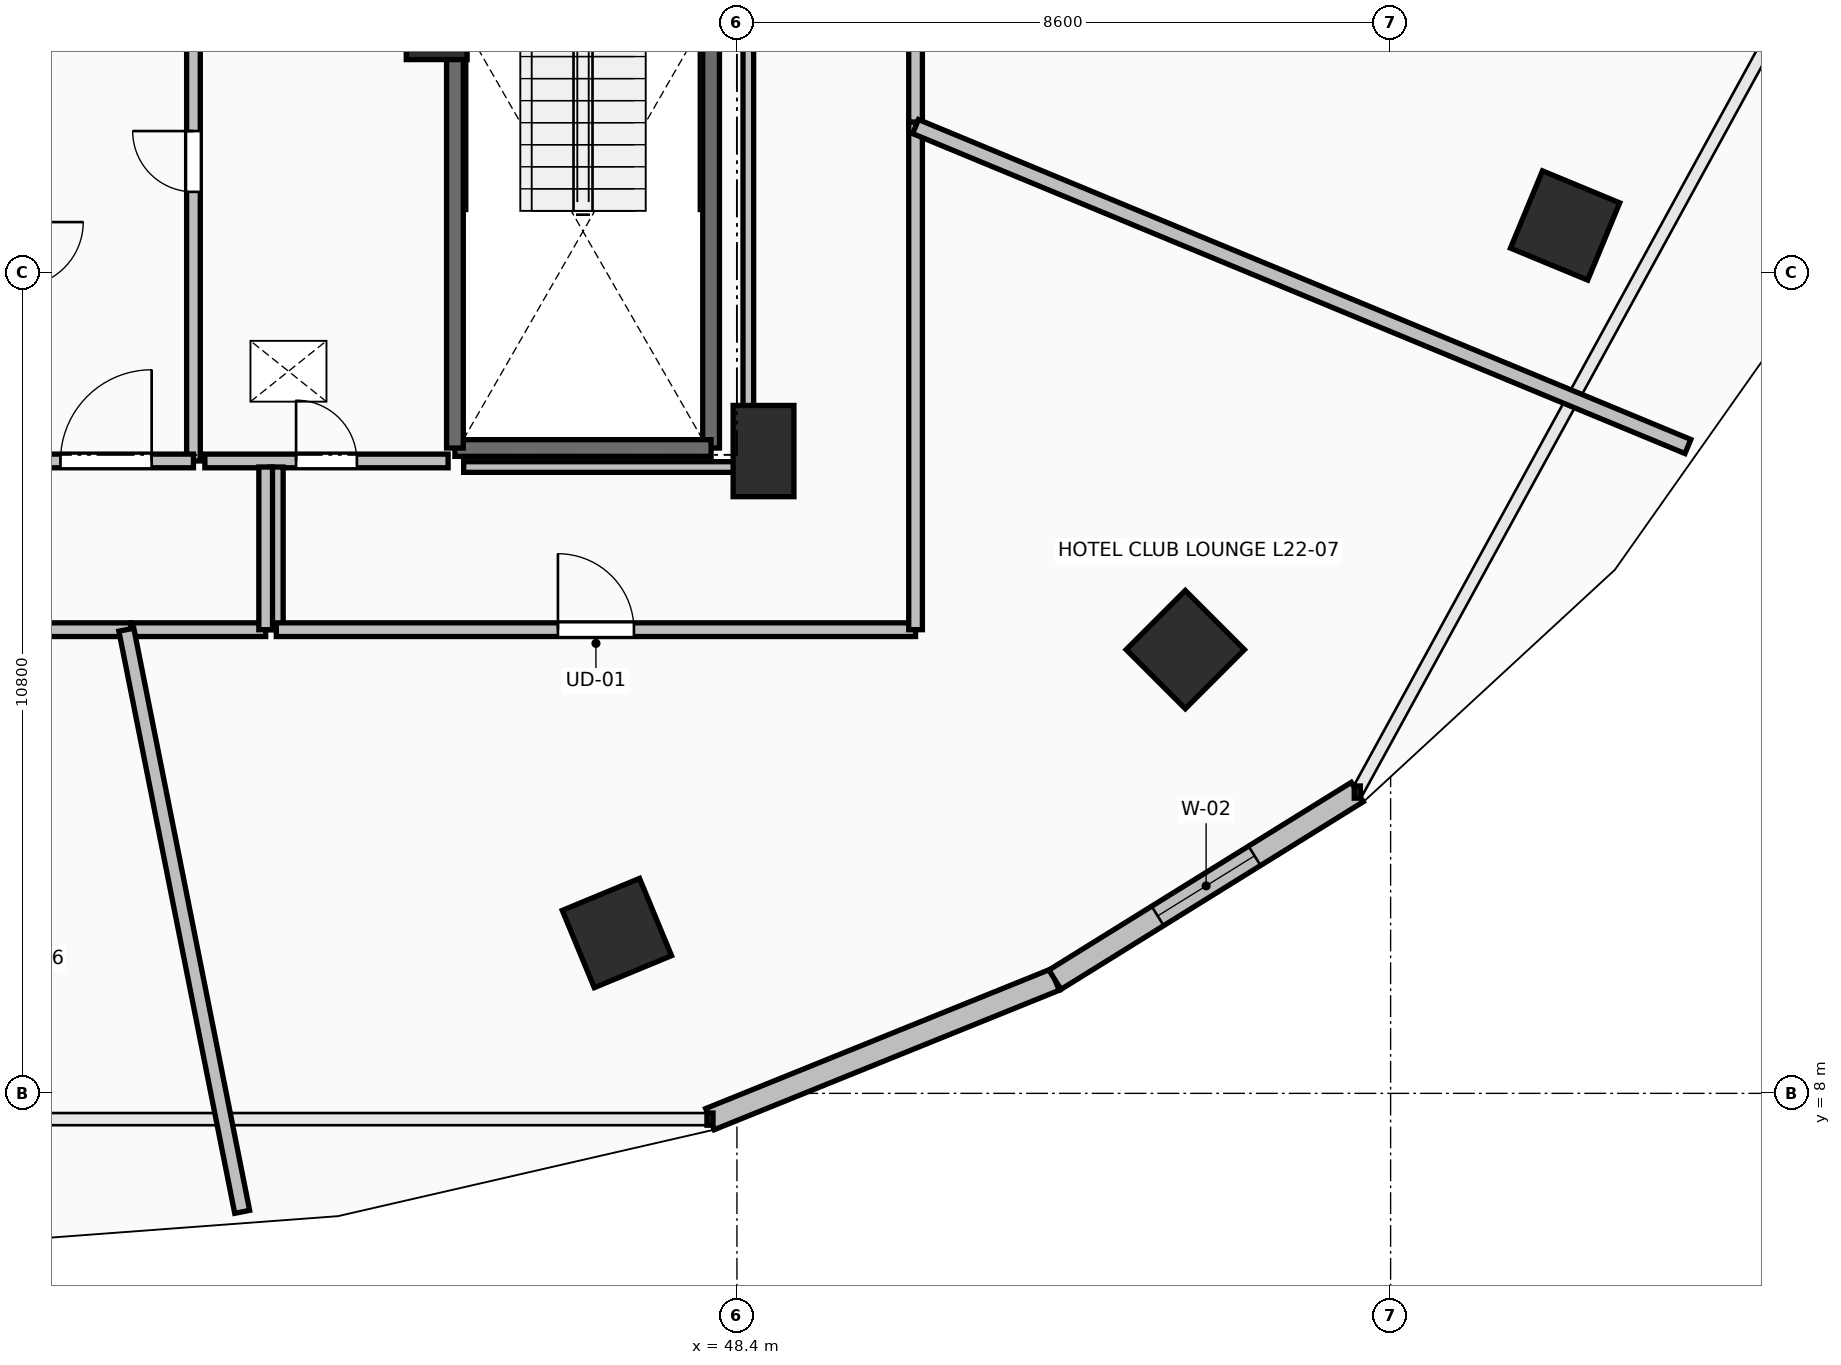
"""IFC4 building model, lengths in metres.
Left out: names, types, materials, properties, quantities, classifications, styles, units other than length and angle.
Written with IfcOpenShell. Run it as: python <this file> out.ifc"""

import sys

from ifc_helpers import new_model, si_unit, direction, frame, frame_2d, origin, origin_2d, place, context, subcontext, project, spatial, rectangle, extrude, element, fill, save


model = new_model("IFC4")
c1 = context("Model", 3, precision=1e-05, world=origin(), true_north=direction((0.0, 1.0)))
c2 = subcontext(c1, "Body", "Model", "MODEL_VIEW")
j1 = project(units=[si_unit("LENGTHUNIT", "METRE"), si_unit("PLANEANGLEUNIT", "RADIAN")], contexts=[c1])
p1 = place(None, origin())
s1 = spatial("IfcSite", under=j1, at=p1, CompositionType="ELEMENT")
p2 = place(p1, origin())
s2 = spatial("IfcBuilding", under=s1, at=p2, CompositionType="ELEMENT")
p3 = place(p2, frame((0.0, 0.0, 85.8)))
s3 = spatial("IfcBuildingStorey", under=s2, at=p3, CompositionType="ELEMENT", Elevation=85.8)
for number, where, z_axis, x_axis in (
    (1, (46.821, 10.109, 0.0), (0.0, 0.0, 1.0), (0.383, -0.924, 0.0)),
    (2, (54.299, 13.838, 0.0), (0.0, 0.0, 1.0), (0.707, -0.707, 0.0)),
    (3, (59.295, 19.418, 0.0), (0.0, 0.0, 1.0), (0.924, -0.383, 0.0)),
):
    element("IfcColumn", number, at=place(p3, frame(where, z_axis=z_axis, x_axis=x_axis)), inside=s3, PredefinedType="COLUMN", context=c2, shape_type="SweptSolid", body=[
        extrude(rectangle(XDim=1.1, YDim=1.1, at=origin_2d()), origin(), (0.0, 0.0, 1.0), 3.5),
    ])
for number, where, z_axis, x_axis in (
    (4, (48.75, 16.45, 0.0), (0.0, 0.0, 1.0), (1.0, 0.0, 0.0)),
    (5, (44.45, 22.2, 0.0), (0.0, 0.0, 1.0), (1.0, 0.0, 0.0)),
):
    element("IfcColumn", number, at=place(p3, frame(where, z_axis=z_axis, x_axis=x_axis)), inside=s3, PredefinedType="PILASTER", context=c2, shape_type="SweptSolid", body=[
        extrude(rectangle(XDim=0.8, YDim=1.2, at=origin_2d()), origin(), (0.0, 0.0, 1.0), 3.5),
    ])
p4 = place(p3, frame((48.045, 7.661, 0.0), z_axis=(0.0, 0.0, 1.0), x_axis=(0.927122233109, 0.374759075775, 0.0)))
e6 = element("IfcWall", 6, at=p4, inside=s3, PredefinedType="STANDARD", context=c2, shape_type="SweptSolid", body=[
    extrude(rectangle(XDim=4.895, YDim=0.3, at=frame_2d((2.448, 0.0))), origin(), (0.0, 0.0, 1.0), 3.24),
])
p5 = place(p3, frame((52.584, 9.495, 0.0), z_axis=(0.0, 0.0, 1.0), x_axis=(0.849684479743, 0.527291461038, 0.0)))
e7 = element("IfcWall", 7, at=p5, inside=s3, PredefinedType="STANDARD", context=c2, shape_type="SweptSolid", body=[
    extrude(rectangle(XDim=4.681, YDim=0.3, at=frame_2d((2.341, 0.0))), origin(), (0.0, 0.0, 1.0), 3.24),
])
p6 = place(p5, frame((1.591, 0.0, 0.85)))
e8 = element("IfcOpeningElement", 8, at=p6, cuts=e7, PredefinedType="OPENING", context=c2, shape_type="SweptSolid", body=[
    extrude(rectangle(XDim=1.5, YDim=2.19, at=frame_2d((0.75, 1.095))), frame((0.0, 0.165, 0.0), z_axis=(0.0, -1.0, 0.0), x_axis=(1.0, 0.0, 0.0)), (0.0, 0.0, 1.0), 0.33),
])
p7 = place(p3, frame((48.06, 23.91, 0.0), z_axis=(0.0, 0.0, 1.0), x_axis=(0.0, -1.0, 0.0)))
e9 = element("IfcWall", 9, at=p7, inside=s3, PredefinedType="SOLIDWALL", context=c2, shape_type="SweptSolid", body=[
    extrude(rectangle(XDim=7.42, YDim=0.22, at=frame_2d((3.71, 0.0))), origin(), (0.0, 0.0, 1.0), 3.24),
])
p8 = place(p3, frame((48.06, 16.49, 0.0), z_axis=(0.0, 0.0, 1.0), x_axis=(-1.0, 0.0, 0.0)))
e10 = element("IfcWall", 10, at=p8, inside=s3, PredefinedType="SOLIDWALL", context=c2, shape_type="SweptSolid", body=[
    extrude(rectangle(XDim=3.37, YDim=0.22, at=frame_2d((1.685, 0.0))), origin(), (0.0, 0.0, 1.0), 3.24),
])
p9 = place(p3, frame((44.69, 16.49, 0.0), z_axis=(0.0, 0.0, 1.0), x_axis=(0.0, 1.0, 0.0)))
e11 = element("IfcWall", 11, at=p9, inside=s3, PredefinedType="SOLIDWALL", context=c2, shape_type="SweptSolid", body=[
    extrude(rectangle(XDim=7.42, YDim=0.22, at=frame_2d((3.71, 0.0))), origin(), (0.0, 0.0, 1.0), 3.24),
])
p10 = place(p3, frame((41.25, 16.32, 0.0), z_axis=(0.0, 0.0, 1.0), x_axis=(0.0, 1.0, 0.0)))
e12 = element("IfcWall", 12, at=p10, inside=s3, PredefinedType="PARTITIONING", context=c2, shape_type="SweptSolid", body=[
    extrude(rectangle(XDim=7.88, YDim=0.18, at=frame_2d((3.94, 0.0))), origin(), (0.0, 0.0, 1.0), 3.24),
])
p11 = place(p10, frame((3.54, 0.0, 0.0)))
e13 = element("IfcOpeningElement", 13, at=p11, cuts=e12, PredefinedType="OPENING", context=c2, shape_type="SweptSolid", body=[
    extrude(rectangle(XDim=0.8, YDim=2.05, at=frame_2d((0.4, 1.025))), frame((0.0, 0.105, 0.0), z_axis=(0.0, -1.0, 0.0), x_axis=(1.0, 0.0, 0.0)), (0.0, 0.0, 1.0), 0.21),
])
p12 = place(p3, frame((38.95, 16.32, 0.0), z_axis=(0.0, 0.0, 1.0), x_axis=(1.0, 0.0, 0.0)))
e14 = element("IfcWall", 14, at=p12, inside=s3, PredefinedType="PARTITIONING", context=c2, shape_type="SweptSolid", body=[
    extrude(rectangle(XDim=2.3, YDim=0.18, at=frame_2d((1.15, 0.0))), origin(), (0.0, 0.0, 1.0), 3.24),
])
p13 = place(p12, frame((0.55, 0.0, 0.0)))
e15 = element("IfcOpeningElement", 15, at=p13, cuts=e14, PredefinedType="OPENING", context=c2, shape_type="SweptSolid", body=[
    extrude(rectangle(XDim=1.2, YDim=2.15, at=frame_2d((0.6, 1.075))), frame((0.0, 0.105, 0.0), z_axis=(0.0, -1.0, 0.0), x_axis=(1.0, 0.0, 0.0)), (0.0, 0.0, 1.0), 0.21),
])
p14 = place(p3, frame((41.4, 16.32, 0.0), z_axis=(0.0, 0.0, 1.0), x_axis=(1.0, 0.0, 0.0)))
e16 = element("IfcWall", 16, at=p14, inside=s3, PredefinedType="PARTITIONING", context=c2, shape_type="SweptSolid", body=[
    extrude(rectangle(XDim=3.2, YDim=0.18, at=frame_2d((1.6, 0.0))), origin(), (0.0, 0.0, 1.0), 3.24),
])
p15 = place(p14, frame((1.2, 0.0, 0.0)))
e17 = element("IfcOpeningElement", 17, at=p15, cuts=e16, PredefinedType="OPENING", context=c2, shape_type="SweptSolid", body=[
    extrude(rectangle(XDim=0.8, YDim=2.05, at=frame_2d((0.4, 1.025))), frame((0.0, 0.105, 0.0), z_axis=(0.0, -1.0, 0.0), x_axis=(1.0, 0.0, 0.0)), (0.0, 0.0, 1.0), 0.21),
])
p16 = place(p3, frame((36.341, 14.1, 0.0), z_axis=(0.0, 0.0, 1.0), x_axis=(1.0, 0.0, 0.0)))
e18 = element("IfcWall", 18, at=p16, inside=s3, PredefinedType="PARTITIONING", context=c2, shape_type="SweptSolid", body=[
    extrude(rectangle(XDim=4.087, YDim=0.18, at=frame_2d((2.043, 0.0))), origin(), (0.0, 0.0, 1.0), 2.922),
])
p17 = place(p16, frame((1.519, 0.0, 0.0)))
e19 = element("IfcOpeningElement", 19, at=p17, cuts=e18, PredefinedType="OPENING", context=c2, shape_type="SweptSolid", body=[
    extrude(rectangle(XDim=1.05, YDim=2.2, at=frame_2d((0.525, 1.1))), frame((0.0, 0.105, 0.0), z_axis=(0.0, -1.0, 0.0), x_axis=(1.0, 0.0, 0.0)), (0.0, 0.0, 1.0), 0.21),
])
p18 = place(p3, frame((42.34, 16.24, 0.0), z_axis=(0.0, 0.0, 1.0), x_axis=(0.0, -1.0, 0.0)))
e20 = element("IfcWall", 20, at=p18, inside=s3, PredefinedType="PARTITIONING", context=c2, shape_type="SweptSolid", body=[
    extrude(rectangle(XDim=2.14, YDim=0.18, at=frame_2d((1.07, 0.0))), origin(), (0.0, 0.0, 1.0), 2.922),
])
p19 = place(p3, frame((42.34, 14.1, 0.0), z_axis=(0.0, 0.0, 1.0), x_axis=(1.0, 0.0, 0.0)))
e21 = element("IfcWall", 21, at=p19, inside=s3, PredefinedType="PARTITIONING", context=c2, shape_type="SweptSolid", body=[
    extrude(rectangle(XDim=8.41, YDim=0.18, at=frame_2d((4.205, 0.0))), origin(), (0.0, 0.0, 1.0), 2.432),
])
p20 = place(p19, frame((3.705, 0.0, 0.0)))
e22 = element("IfcOpeningElement", 22, at=p20, cuts=e21, PredefinedType="OPENING", context=c2, shape_type="SweptSolid", body=[
    extrude(rectangle(XDim=1.0, YDim=2.15, at=frame_2d((0.5, 1.075))), frame((0.0, 0.105, 0.0), z_axis=(0.0, -1.0, 0.0), x_axis=(1.0, 0.0, 0.0)), (0.0, 0.0, 1.0), 0.21),
])
p21 = place(p3, frame((50.75, 14.1, 0.0), z_axis=(0.0, 0.0, 1.0), x_axis=(0.0, 1.0, 0.0)))
e23 = element("IfcWall", 23, at=p21, inside=s3, PredefinedType="PARTITIONING", context=c2, shape_type="SweptSolid", body=[
    extrude(rectangle(XDim=6.679, YDim=0.18, at=frame_2d((3.339, 0.0))), origin(), (0.0, 0.0, 1.0), 2.432),
])
p22 = place(p3, frame((40.428, 14.1, 0.0), z_axis=(0.0, 0.0, 1.0), x_axis=(1.0, 0.0, 0.0)))
e24 = element("IfcWall", 24, at=p22, inside=s3, PredefinedType="PARTITIONING", context=c2, shape_type="SweptSolid", body=[
    extrude(rectangle(XDim=1.772, YDim=0.18, at=frame_2d((0.886, 0.0))), origin(), (0.0, 0.0, 1.0), 2.922),
])
p23 = place(p3, frame((42.2, 14.1, 0.0), z_axis=(0.0, 0.0, 1.0), x_axis=(0.0, 1.0, 0.0)))
e25 = element("IfcWall", 25, at=p23, inside=s3, PredefinedType="PARTITIONING", context=c2, shape_type="SweptSolid", body=[
    extrude(rectangle(XDim=2.14, YDim=0.18, at=frame_2d((1.07, 0.0))), origin(), (0.0, 0.0, 1.0), 2.922),
])
p24 = place(p3, frame((50.75, 20.779, 0.0), z_axis=(0.0, 0.0, 1.0), x_axis=(0.0, 1.0, 0.0)))
e26 = element("IfcWall", 26, at=p24, inside=s3, PredefinedType="PARTITIONING", context=c2, shape_type="SweptSolid", body=[
    extrude(rectangle(XDim=13.54, YDim=0.18, at=frame_2d((6.77, 0.0))), origin(), (0.0, 0.0, 1.0), 2.432),
])
p25 = place(p24, frame((6.27, 0.0, 0.0)))
e27 = element("IfcOpeningElement", 27, at=p25, cuts=e26, PredefinedType="OPENING", context=c2, shape_type="SweptSolid", body=[
    extrude(rectangle(XDim=1.0, YDim=2.15, at=frame_2d((0.5, 1.075))), frame((0.0, 0.105, 0.0), z_axis=(0.0, -1.0, 0.0), x_axis=(1.0, 0.0, 0.0)), (0.0, 0.0, 1.0), 0.21),
])
p26 = place(p3, frame((41.891, 6.441, 0.0), z_axis=(0.0, 0.0, 1.0), x_axis=(-0.195172155482, 0.980768999166, 0.0)))
e28 = element("IfcWall", 28, at=p26, inside=s3, PredefinedType="PARTITIONING", context=c2, shape_type="SweptSolid", body=[
    extrude(rectangle(XDim=7.809, YDim=0.2, at=frame_2d((3.905, 0.0))), origin(), (0.0, 0.0, 1.0), 2.432),
])
p27 = place(p3, frame((60.911, 16.51, 0.0), z_axis=(0.0, 0.0, 1.0), x_axis=(-0.923872894692, 0.382699457086, 0.0)))
e29 = element("IfcWall", 29, at=p27, inside=s3, PredefinedType="PARTITIONING", context=c2, shape_type="SweptSolid", body=[
    extrude(rectangle(XDim=10.998, YDim=0.2, at=frame_2d((5.499, 0.0))), origin(), (0.0, 0.0, 1.0), 2.677),
])
p28 = place(p3, frame((48.55, 23.754, 0.0), z_axis=(0.0, 0.0, 1.0), x_axis=(0.0, -1.0, 0.0)))
e30 = element("IfcWall", 30, at=p28, inside=s3, PredefinedType="PARTITIONING", context=c2, shape_type="SweptSolid", body=[
    extrude(rectangle(XDim=7.514, YDim=0.14, at=frame_2d((3.757, 0.0))), origin(), (0.0, 0.0, 1.0), 2.432),
])
p29 = place(p3, frame((48.55, 16.24, 0.0), z_axis=(0.0, 0.0, 1.0), x_axis=(-1.0, 0.0, 0.0)))
e31 = element("IfcWall", 31, at=p29, inside=s3, PredefinedType="PARTITIONING", context=c2, shape_type="SweptSolid", body=[
    extrude(rectangle(XDim=3.745, YDim=0.14, at=frame_2d((1.873, 0.0))), origin(), (0.0, 0.0, 1.0), 2.432),
])
p30 = place(p6, origin())
e32 = element("IfcWindow", 32, at=p30, inside=s3, PartitioningType="SINGLE_PANEL", PredefinedType="WINDOW", context=c2, shape_type="SweptSolid", body=[
    extrude(rectangle(XDim=1.5, YDim=2.19, at=frame_2d((0.75, 1.095))), frame((0.0, 0.03, 0.0), z_axis=(0.0, -1.0, 0.0), x_axis=(1.0, 0.0, 0.0)), (0.0, 0.0, 1.0), 0.06),
])
fill(e8, e32)
p31 = place(p11, origin())
e33 = element("IfcDoor", 33, at=p31, inside=s3, OperationType="SINGLE_SWING_RIGHT", PredefinedType="DOOR", context=c2, shape_type="SweptSolid", body=[
    extrude(rectangle(XDim=0.8, YDim=2.05, at=frame_2d((0.4, 1.025))), frame((0.0, 0.025, 0.0), z_axis=(0.0, -1.0, 0.0), x_axis=(1.0, 0.0, 0.0)), (0.0, 0.0, 1.0), 0.05),
])
fill(e13, e33)
p32 = place(p13, origin())
e34 = element("IfcDoor", 34, at=p32, inside=s3, OperationType="SINGLE_SWING_RIGHT", PredefinedType="DOOR", context=c2, shape_type="SweptSolid", body=[
    extrude(rectangle(XDim=1.2, YDim=2.15, at=frame_2d((0.6, 1.075))), frame((0.0, 0.025, 0.0), z_axis=(0.0, -1.0, 0.0), x_axis=(1.0, 0.0, 0.0)), (0.0, 0.0, 1.0), 0.05),
])
fill(e15, e34)
p33 = place(p15, origin())
e35 = element("IfcDoor", 35, at=p33, inside=s3, OperationType="SINGLE_SWING_LEFT", PredefinedType="DOOR", context=c2, shape_type="SweptSolid", body=[
    extrude(rectangle(XDim=0.8, YDim=2.05, at=frame_2d((0.4, 1.025))), frame((0.0, 0.025, 0.0), z_axis=(0.0, -1.0, 0.0), x_axis=(1.0, 0.0, 0.0)), (0.0, 0.0, 1.0), 0.05),
])
fill(e17, e35)
p34 = place(p20, origin())
e36 = element("IfcDoor", 36, at=p34, inside=s3, OperationType="SINGLE_SWING_LEFT", PredefinedType="DOOR", context=c2, shape_type="SweptSolid", body=[
    extrude(rectangle(XDim=1.0, YDim=2.15, at=frame_2d((0.5, 1.075))), frame((0.0, 0.025, 0.0), z_axis=(0.0, -1.0, 0.0), x_axis=(1.0, 0.0, 0.0)), (0.0, 0.0, 1.0), 0.05),
])
fill(e22, e36)
save(model, sys.argv[1])
